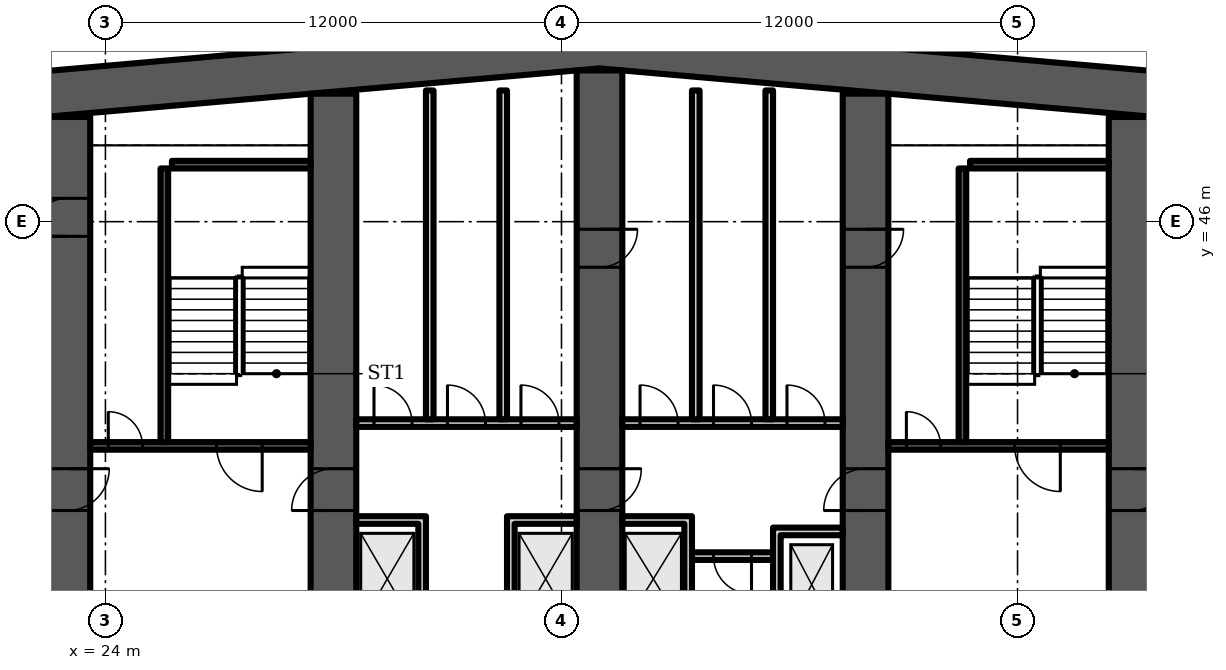
"""IFC4 building model, lengths in metres.
Left out: names, types, materials, properties, quantities, classifications, styles, units other than length and angle.
Written with IfcOpenShell. Run it as: python <this file> out.ifc"""

import sys

from ifc_helpers import new_model, si_unit, direction, frame, frame_2d, origin, place, context, subcontext, project, spatial, polyline, rectangle, outline, extrude, element, fill, save


model = new_model("IFC4")
c1 = context("Model", 3, precision=1e-05, world=origin(), true_north=direction((0.0, 1.0)))
c2 = subcontext(c1, "Body", "Model", "MODEL_VIEW")
j1 = project(units=[si_unit("LENGTHUNIT", "METRE"), si_unit("PLANEANGLEUNIT", "RADIAN")], contexts=[c1])
p1 = place(None, origin())
s1 = spatial("IfcSite", under=j1, at=p1, CompositionType="ELEMENT")
p2 = place(p1, origin())
s2 = spatial("IfcBuilding", under=s1, at=p2, CompositionType="ELEMENT")
p3 = place(p2, frame((0.0, 0.0, 84.7)))
s3 = spatial("IfcBuildingStorey", under=s2, at=p3, CompositionType="ELEMENT", Elevation=84.7)
p4 = place(p3, origin())
e1 = element("IfcWall", 1, at=p4, inside=s3, PredefinedType="SHEAR", context=c2, shape_type="SweptSolid", body=[
    extrude(outline(polyline([(9.0, 47.583), (37.0, 50.032), (65.0, 47.583), (65.0, 48.787), (37.0, 51.237), (9.0, 48.787), (9.0, 47.583)])), origin(), (0.0, 0.0, 1.0), 3.6),
])
p5 = place(p3, frame((23.0, 35.2, 0.0), z_axis=(0.0, 0.0, 1.0), x_axis=(0.0, 1.0, 0.0)))
e2 = element("IfcWall", 2, at=p5, inside=s3, PredefinedType="SHEAR", context=c2, shape_type="SweptSolid", body=[
    extrude(rectangle(XDim=13.555, YDim=1.2, at=frame_2d((6.778, 0.0))), origin(), (0.0, 0.0, 1.0), 3.6),
])
p6 = place(p5, frame((10.414, 0.0, 0.0)))
e3 = element("IfcOpeningElement", 3, at=p6, cuts=e2, PredefinedType="OPENING", context=c2, shape_type="SweptSolid", body=[
    extrude(rectangle(XDim=1.0, YDim=2.1, at=frame_2d((0.5, 1.05))), frame((0.0, 0.61, 0.0), z_axis=(0.0, -1.0, 0.0), x_axis=(1.0, 0.0, 0.0)), (0.0, 0.0, 1.0), 1.22),
])
p7 = place(p5, frame((3.2, 0.0, 0.0)))
e4 = element("IfcOpeningElement", 4, at=p7, cuts=e2, PredefinedType="OPENING", context=c2, shape_type="SweptSolid", body=[
    extrude(rectangle(XDim=1.1, YDim=2.1, at=frame_2d((0.55, 1.05))), frame((0.0, 0.61, 0.0), z_axis=(0.0, -1.0, 0.0), x_axis=(1.0, 0.0, 0.0)), (0.0, 0.0, 1.0), 1.22),
])
p8 = place(p3, frame((30.0, 35.2, 0.0), z_axis=(0.0, 0.0, 1.0), x_axis=(0.0, 1.0, 0.0)))
e5 = element("IfcWall", 5, at=p8, inside=s3, PredefinedType="SHEAR", context=c2, shape_type="SweptSolid", body=[
    extrude(rectangle(XDim=14.168, YDim=1.2, at=frame_2d((7.084, 0.0))), origin(), (0.0, 0.0, 1.0), 3.6),
])
p9 = place(p8, frame((3.2, 0.0, 0.0)))
e6 = element("IfcOpeningElement", 6, at=p9, cuts=e5, PredefinedType="OPENING", context=c2, shape_type="SweptSolid", body=[
    extrude(rectangle(XDim=1.1, YDim=2.1, at=frame_2d((0.55, 1.05))), frame((0.0, 0.61, 0.0), z_axis=(0.0, -1.0, 0.0), x_axis=(1.0, 0.0, 0.0)), (0.0, 0.0, 1.0), 1.22),
])
p10 = place(p3, frame((37.0, 35.2, 0.0), z_axis=(0.0, 0.0, 1.0), x_axis=(0.0, 1.0, 0.0)))
e7 = element("IfcWall", 7, at=p10, inside=s3, PredefinedType="SHEAR", context=c2, shape_type="SweptSolid", body=[
    extrude(rectangle(XDim=14.78, YDim=1.2, at=frame_2d((7.39, 0.0))), origin(), (0.0, 0.0, 1.0), 3.6),
])
p11 = place(p10, frame((3.2, 0.0, 0.0)))
e8 = element("IfcOpeningElement", 8, at=p11, cuts=e7, PredefinedType="OPENING", context=c2, shape_type="SweptSolid", body=[
    extrude(rectangle(XDim=1.1, YDim=2.1, at=frame_2d((0.55, 1.05))), frame((0.0, 0.61, 0.0), z_axis=(0.0, -1.0, 0.0), x_axis=(1.0, 0.0, 0.0)), (0.0, 0.0, 1.0), 1.22),
])
p12 = place(p10, frame((9.6, 0.0, 0.0)))
e9 = element("IfcOpeningElement", 9, at=p12, cuts=e7, PredefinedType="OPENING", context=c2, shape_type="SweptSolid", body=[
    extrude(rectangle(XDim=1.0, YDim=2.1, at=frame_2d((0.5, 1.05))), frame((0.0, 0.61, 0.0), z_axis=(0.0, -1.0, 0.0), x_axis=(1.0, 0.0, 0.0)), (0.0, 0.0, 1.0), 1.22),
])
p13 = place(p3, frame((44.0, 35.2, 0.0), z_axis=(0.0, 0.0, 1.0), x_axis=(0.0, 1.0, 0.0)))
e10 = element("IfcWall", 10, at=p13, inside=s3, PredefinedType="SHEAR", context=c2, shape_type="SweptSolid", body=[
    extrude(rectangle(XDim=14.168, YDim=1.2, at=frame_2d((7.084, 0.0))), origin(), (0.0, 0.0, 1.0), 3.6),
])
p14 = place(p13, frame((3.2, 0.0, 0.0)))
e11 = element("IfcOpeningElement", 11, at=p14, cuts=e10, PredefinedType="OPENING", context=c2, shape_type="SweptSolid", body=[
    extrude(rectangle(XDim=1.1, YDim=2.1, at=frame_2d((0.55, 1.05))), frame((0.0, 0.61, 0.0), z_axis=(0.0, -1.0, 0.0), x_axis=(1.0, 0.0, 0.0)), (0.0, 0.0, 1.0), 1.22),
])
p15 = place(p13, frame((9.6, 0.0, 0.0)))
e12 = element("IfcOpeningElement", 12, at=p15, cuts=e10, PredefinedType="OPENING", context=c2, shape_type="SweptSolid", body=[
    extrude(rectangle(XDim=1.0, YDim=2.1, at=frame_2d((0.5, 1.05))), frame((0.0, 0.61, 0.0), z_axis=(0.0, -1.0, 0.0), x_axis=(1.0, 0.0, 0.0)), (0.0, 0.0, 1.0), 1.22),
])
p16 = place(p3, frame((51.0, 35.2, 0.0), z_axis=(0.0, 0.0, 1.0), x_axis=(0.0, 1.0, 0.0)))
e13 = element("IfcWall", 13, at=p16, inside=s3, PredefinedType="SHEAR", context=c2, shape_type="SweptSolid", body=[
    extrude(rectangle(XDim=13.555, YDim=1.2, at=frame_2d((6.778, 0.0))), origin(), (0.0, 0.0, 1.0), 3.6),
])
p17 = place(p16, frame((3.2, 0.0, 0.0)))
e14 = element("IfcOpeningElement", 14, at=p17, cuts=e13, PredefinedType="OPENING", context=c2, shape_type="SweptSolid", body=[
    extrude(rectangle(XDim=1.1, YDim=2.1, at=frame_2d((0.55, 1.05))), frame((0.0, 0.61, 0.0), z_axis=(0.0, -1.0, 0.0), x_axis=(1.0, 0.0, 0.0)), (0.0, 0.0, 1.0), 1.22),
])
p18 = place(p3, frame((23.6, 40.1, 0.0), z_axis=(0.0, 0.0, 1.0), x_axis=(1.0, 0.0, 0.0)))
e15 = element("IfcWall", 15, at=p18, inside=s3, PredefinedType="SHEAR", context=c2, shape_type="SweptSolid", body=[
    extrude(rectangle(XDim=5.8, YDim=0.2, at=frame_2d((2.9, 0.0))), origin(), (0.0, 0.0, 1.0), 3.2),
])
p19 = place(p18, frame((3.325, 0.0, 0.0)))
e16 = element("IfcOpeningElement", 16, at=p19, cuts=e15, PredefinedType="OPENING", context=c2, shape_type="SweptSolid", body=[
    extrude(rectangle(XDim=1.2, YDim=2.1, at=frame_2d((0.6, 1.05))), frame((0.0, 0.11, 0.0), z_axis=(0.0, -1.0, 0.0), x_axis=(1.0, 0.0, 0.0)), (0.0, 0.0, 1.0), 0.22),
])
p20 = place(p18, frame((0.475, 0.0, 0.0)))
e17 = element("IfcOpeningElement", 17, at=p20, cuts=e15, PredefinedType="OPENING", context=c2, shape_type="SweptSolid", body=[
    extrude(rectangle(XDim=0.9, YDim=2.1, at=frame_2d((0.45, 1.05))), frame((0.0, 0.11, 0.0), z_axis=(0.0, -1.0, 0.0), x_axis=(1.0, 0.0, 0.0)), (0.0, 0.0, 1.0), 0.22),
])
p21 = place(p3, frame((25.55, 40.2, 0.0), z_axis=(0.0, 0.0, 1.0), x_axis=(0.0, 1.0, 0.0)))
e18 = element("IfcWall", 18, at=p21, inside=s3, PredefinedType="SHEAR", context=c2, shape_type="SweptSolid", body=[
    extrude(rectangle(XDim=7.2, YDim=0.2, at=frame_2d((3.6, 0.0))), origin(), (0.0, 0.0, 1.0), 3.2),
])
p22 = place(p3, frame((25.75, 47.5, 0.0), z_axis=(0.0, 0.0, 1.0), x_axis=(1.0, 0.0, 0.0)))
e19 = element("IfcWall", 19, at=p22, inside=s3, PredefinedType="SHEAR", context=c2, shape_type="SweptSolid", body=[
    extrude(rectangle(XDim=3.65, YDim=0.2, at=frame_2d((1.825, 0.0))), origin(), (0.0, 0.0, 1.0), 3.2),
])
p23 = place(p3, frame((30.6, 40.7, 0.0), z_axis=(0.0, 0.0, 1.0), x_axis=(1.0, 0.0, 0.0)))
e20 = element("IfcWall", 20, at=p23, inside=s3, PredefinedType="PARTITIONING", context=c2, shape_type="SweptSolid", body=[
    extrude(rectangle(XDim=5.8, YDim=0.2, at=frame_2d((2.9, 0.0))), origin(), (0.0, 0.0, 1.0), 3.2),
])
p24 = place(p23, frame((0.467, 0.0, 0.0)))
e21 = element("IfcOpeningElement", 21, at=p24, cuts=e20, PredefinedType="OPENING", context=c2, shape_type="SweptSolid", body=[
    extrude(rectangle(XDim=1.0, YDim=2.1, at=frame_2d((0.5, 1.05))), frame((0.0, 0.11, 0.0), z_axis=(0.0, -1.0, 0.0), x_axis=(1.0, 0.0, 0.0)), (0.0, 0.0, 1.0), 0.22),
])
p25 = place(p23, frame((2.4, 0.0, 0.0)))
e22 = element("IfcOpeningElement", 22, at=p25, cuts=e20, PredefinedType="OPENING", context=c2, shape_type="SweptSolid", body=[
    extrude(rectangle(XDim=1.0, YDim=2.1, at=frame_2d((0.5, 1.05))), frame((0.0, 0.11, 0.0), z_axis=(0.0, -1.0, 0.0), x_axis=(1.0, 0.0, 0.0)), (0.0, 0.0, 1.0), 0.22),
])
p26 = place(p23, frame((4.333, 0.0, 0.0)))
e23 = element("IfcOpeningElement", 23, at=p26, cuts=e20, PredefinedType="OPENING", context=c2, shape_type="SweptSolid", body=[
    extrude(rectangle(XDim=1.0, YDim=2.1, at=frame_2d((0.5, 1.05))), frame((0.0, 0.11, 0.0), z_axis=(0.0, -1.0, 0.0), x_axis=(1.0, 0.0, 0.0)), (0.0, 0.0, 1.0), 0.22),
])
p27 = place(p3, frame((0.0, 0.0, -0.0)))
e24 = element("IfcWall", 24, at=p27, inside=s3, PredefinedType="PARTITIONING", context=c2, shape_type="SweptSolid", body=[
    extrude(outline(polyline([(32.233, 38.05), (30.6, 38.05), (30.6, 38.25), (32.233, 38.25), (32.433, 38.25), (32.433, 35.2), (32.233, 35.2), (32.233, 38.05)])), origin(), (0.0, 0.0, 1.0), 3.2),
])
p28 = place(p3, frame((0.0, 0.0, -0.0)))
e25 = element("IfcWall", 25, at=p28, inside=s3, PredefinedType="PARTITIONING", context=c2, shape_type="SweptSolid", body=[
    extrude(outline(polyline([(34.567, 38.25), (34.767, 38.25), (36.4, 38.25), (36.4, 38.05), (34.767, 38.05), (34.767, 35.2), (34.567, 35.2), (34.567, 38.25)])), origin(), (0.0, 0.0, 1.0), 3.2),
])
for number, where, z_axis, x_axis in (
    (26, (32.533, 40.8, 0.0), (0.0, 0.0, 1.0), (0.0, 1.0, 0.0)),
    (27, (34.467, 40.8, 0.0), (0.0, 0.0, 1.0), (0.0, 1.0, 0.0)),
):
    element("IfcWall", number, at=place(p3, frame(where, z_axis=z_axis, x_axis=x_axis)), inside=s3, PredefinedType="PARTITIONING", context=c2, shape_type="SweptSolid", body=[
        extrude(rectangle(XDim=8.653, YDim=0.2, at=frame_2d((4.326, 0.0))), origin(), (0.0, 0.0, 1.0), 3.2),
    ])
p29 = place(p3, frame((39.433, 37.2, 0.0), z_axis=(0.0, 0.0, 1.0), x_axis=(1.0, 0.0, 0.0)))
e28 = element("IfcWall", 28, at=p29, inside=s3, PredefinedType="PARTITIONING", context=c2, shape_type="SweptSolid", body=[
    extrude(rectangle(XDim=2.133, YDim=0.2, at=frame_2d((1.067, 0.0))), origin(), (0.0, 0.0, 1.0), 3.2),
])
p30 = place(p29, frame((0.567, 0.0, 0.0)))
e29 = element("IfcOpeningElement", 29, at=p30, cuts=e28, PredefinedType="OPENING", context=c2, shape_type="SweptSolid", body=[
    extrude(rectangle(XDim=1.0, YDim=2.1, at=frame_2d((0.5, 1.05))), frame((0.0, 0.11, 0.0), z_axis=(0.0, -1.0, 0.0), x_axis=(1.0, 0.0, 0.0)), (0.0, 0.0, 1.0), 0.22),
])
p31 = place(p3, frame((37.6, 40.7, 0.0), z_axis=(0.0, 0.0, 1.0), x_axis=(1.0, 0.0, 0.0)))
e30 = element("IfcWall", 30, at=p31, inside=s3, PredefinedType="PARTITIONING", context=c2, shape_type="SweptSolid", body=[
    extrude(rectangle(XDim=5.8, YDim=0.2, at=frame_2d((2.9, 0.0))), origin(), (0.0, 0.0, 1.0), 3.2),
])
p32 = place(p31, frame((0.467, 0.0, 0.0)))
e31 = element("IfcOpeningElement", 31, at=p32, cuts=e30, PredefinedType="OPENING", context=c2, shape_type="SweptSolid", body=[
    extrude(rectangle(XDim=1.0, YDim=2.1, at=frame_2d((0.5, 1.05))), frame((0.0, 0.11, 0.0), z_axis=(0.0, -1.0, 0.0), x_axis=(1.0, 0.0, 0.0)), (0.0, 0.0, 1.0), 0.22),
])
p33 = place(p31, frame((2.4, 0.0, 0.0)))
e32 = element("IfcOpeningElement", 32, at=p33, cuts=e30, PredefinedType="OPENING", context=c2, shape_type="SweptSolid", body=[
    extrude(rectangle(XDim=1.0, YDim=2.1, at=frame_2d((0.5, 1.05))), frame((0.0, 0.11, 0.0), z_axis=(0.0, -1.0, 0.0), x_axis=(1.0, 0.0, 0.0)), (0.0, 0.0, 1.0), 0.22),
])
p34 = place(p31, frame((4.333, 0.0, 0.0)))
e33 = element("IfcOpeningElement", 33, at=p34, cuts=e30, PredefinedType="OPENING", context=c2, shape_type="SweptSolid", body=[
    extrude(rectangle(XDim=1.0, YDim=2.1, at=frame_2d((0.5, 1.05))), frame((0.0, 0.11, 0.0), z_axis=(0.0, -1.0, 0.0), x_axis=(1.0, 0.0, 0.0)), (0.0, 0.0, 1.0), 0.22),
])
p35 = place(p3, frame((0.0, 0.0, -0.0)))
e34 = element("IfcWall", 34, at=p35, inside=s3, PredefinedType="PARTITIONING", context=c2, shape_type="SweptSolid", body=[
    extrude(outline(polyline([(41.567, 37.95), (41.767, 37.95), (43.4, 37.95), (43.4, 37.75), (41.767, 37.75), (41.767, 35.2), (41.567, 35.2), (41.567, 37.95)])), origin(), (0.0, 0.0, 1.0), 3.2),
])
p36 = place(p3, frame((0.0, 0.0, -0.0)))
e35 = element("IfcWall", 35, at=p36, inside=s3, PredefinedType="PARTITIONING", context=c2, shape_type="SweptSolid", body=[
    extrude(outline(polyline([(39.233, 38.05), (37.6, 38.05), (37.6, 38.25), (39.233, 38.25), (39.433, 38.25), (39.433, 35.2), (39.233, 35.2), (39.233, 38.05)])), origin(), (0.0, 0.0, 1.0), 3.2),
])
for number, where, z_axis, x_axis in (
    (36, (39.533, 40.8, 0.0), (0.0, 0.0, 1.0), (0.0, 1.0, 0.0)),
    (37, (41.467, 40.8, 0.0), (0.0, 0.0, 1.0), (0.0, 1.0, 0.0)),
):
    element("IfcWall", number, at=place(p3, frame(where, z_axis=z_axis, x_axis=x_axis)), inside=s3, PredefinedType="PARTITIONING", context=c2, shape_type="SweptSolid", body=[
        extrude(rectangle(XDim=8.653, YDim=0.2, at=frame_2d((4.326, 0.0))), origin(), (0.0, 0.0, 1.0), 3.2),
    ])
p37 = place(p3, frame((44.6, 40.1, 0.0), z_axis=(0.0, 0.0, 1.0), x_axis=(1.0, 0.0, 0.0)))
e38 = element("IfcWall", 38, at=p37, inside=s3, PredefinedType="SHEAR", context=c2, shape_type="SweptSolid", body=[
    extrude(rectangle(XDim=5.8, YDim=0.2, at=frame_2d((2.9, 0.0))), origin(), (0.0, 0.0, 1.0), 3.2),
])
p38 = place(p37, frame((3.325, 0.0, 0.0)))
e39 = element("IfcOpeningElement", 39, at=p38, cuts=e38, PredefinedType="OPENING", context=c2, shape_type="SweptSolid", body=[
    extrude(rectangle(XDim=1.2, YDim=2.1, at=frame_2d((0.6, 1.05))), frame((0.0, 0.11, 0.0), z_axis=(0.0, -1.0, 0.0), x_axis=(1.0, 0.0, 0.0)), (0.0, 0.0, 1.0), 0.22),
])
p39 = place(p37, frame((0.475, 0.0, 0.0)))
e40 = element("IfcOpeningElement", 40, at=p39, cuts=e38, PredefinedType="OPENING", context=c2, shape_type="SweptSolid", body=[
    extrude(rectangle(XDim=0.9, YDim=2.1, at=frame_2d((0.45, 1.05))), frame((0.0, 0.11, 0.0), z_axis=(0.0, -1.0, 0.0), x_axis=(1.0, 0.0, 0.0)), (0.0, 0.0, 1.0), 0.22),
])
p40 = place(p3, frame((46.55, 40.2, 0.0), z_axis=(0.0, 0.0, 1.0), x_axis=(0.0, 1.0, 0.0)))
e41 = element("IfcWall", 41, at=p40, inside=s3, PredefinedType="SHEAR", context=c2, shape_type="SweptSolid", body=[
    extrude(rectangle(XDim=7.2, YDim=0.2, at=frame_2d((3.6, 0.0))), origin(), (0.0, 0.0, 1.0), 3.2),
])
p41 = place(p3, frame((46.75, 47.5, 0.0), z_axis=(0.0, 0.0, 1.0), x_axis=(1.0, 0.0, 0.0)))
e42 = element("IfcWall", 42, at=p41, inside=s3, PredefinedType="SHEAR", context=c2, shape_type="SweptSolid", body=[
    extrude(rectangle(XDim=3.65, YDim=0.2, at=frame_2d((1.825, 0.0))), origin(), (0.0, 0.0, 1.0), 3.2),
])
p42 = place(p6, origin())
e43 = element("IfcDoor", 43, at=p42, inside=s3, OperationType="SINGLE_SWING_LEFT", PredefinedType="DOOR", context=c2, shape_type="SweptSolid", body=[
    extrude(rectangle(XDim=1.0, YDim=2.1, at=frame_2d((0.5, 1.05))), frame((0.0, 0.6, 0.0), z_axis=(0.0, -1.0, 0.0), x_axis=(1.0, 0.0, 0.0)), (0.0, 0.0, 1.0), 1.199),
])
fill(e3, e43)
p43 = place(p19, origin())
e44 = element("IfcDoor", 44, at=p43, inside=s3, OperationType="SINGLE_SWING_RIGHT", PredefinedType="DOOR", context=c2, shape_type="SweptSolid", body=[
    extrude(rectangle(XDim=1.2, YDim=2.1, at=frame_2d((0.6, 1.05))), frame((0.0, 0.025, 0.0), z_axis=(0.0, -1.0, 0.0), x_axis=(1.0, 0.0, 0.0)), (0.0, 0.0, 1.0), 0.05),
])
fill(e16, e44)
p44 = place(p20, origin())
e45 = element("IfcDoor", 45, at=p44, inside=s3, OperationType="SINGLE_SWING_LEFT", PredefinedType="DOOR", context=c2, shape_type="SweptSolid", body=[
    extrude(rectangle(XDim=0.9, YDim=2.1, at=frame_2d((0.45, 1.05))), frame((0.0, 0.025, 0.0), z_axis=(0.0, -1.0, 0.0), x_axis=(1.0, 0.0, 0.0)), (0.0, 0.0, 1.0), 0.05),
])
fill(e17, e45)
p45 = place(p24, origin())
e46 = element("IfcDoor", 46, at=p45, inside=s3, OperationType="SINGLE_SWING_LEFT", PredefinedType="DOOR", context=c2, shape_type="SweptSolid", body=[
    extrude(rectangle(XDim=1.0, YDim=2.1, at=frame_2d((0.5, 1.05))), frame((0.0, 0.025, 0.0), z_axis=(0.0, -1.0, 0.0), x_axis=(1.0, 0.0, 0.0)), (0.0, 0.0, 1.0), 0.05),
])
fill(e21, e46)
p46 = place(p25, origin())
e47 = element("IfcDoor", 47, at=p46, inside=s3, OperationType="SINGLE_SWING_LEFT", PredefinedType="DOOR", context=c2, shape_type="SweptSolid", body=[
    extrude(rectangle(XDim=1.0, YDim=2.1, at=frame_2d((0.5, 1.05))), frame((0.0, 0.025, 0.0), z_axis=(0.0, -1.0, 0.0), x_axis=(1.0, 0.0, 0.0)), (0.0, 0.0, 1.0), 0.05),
])
fill(e22, e47)
p47 = place(p26, origin())
e48 = element("IfcDoor", 48, at=p47, inside=s3, OperationType="SINGLE_SWING_LEFT", PredefinedType="DOOR", context=c2, shape_type="SweptSolid", body=[
    extrude(rectangle(XDim=1.0, YDim=2.1, at=frame_2d((0.5, 1.05))), frame((0.0, 0.025, 0.0), z_axis=(0.0, -1.0, 0.0), x_axis=(1.0, 0.0, 0.0)), (0.0, 0.0, 1.0), 0.05),
])
fill(e23, e48)
p48 = place(p30, origin())
e49 = element("IfcDoor", 49, at=p48, inside=s3, OperationType="SINGLE_SWING_RIGHT", PredefinedType="DOOR", context=c2, shape_type="SweptSolid", body=[
    extrude(rectangle(XDim=1.0, YDim=2.1, at=frame_2d((0.5, 1.05))), frame((0.0, 0.025, 0.0), z_axis=(0.0, -1.0, 0.0), x_axis=(1.0, 0.0, 0.0)), (0.0, 0.0, 1.0), 0.05),
])
fill(e29, e49)
p49 = place(p32, origin())
e50 = element("IfcDoor", 50, at=p49, inside=s3, OperationType="SINGLE_SWING_LEFT", PredefinedType="DOOR", context=c2, shape_type="SweptSolid", body=[
    extrude(rectangle(XDim=1.0, YDim=2.1, at=frame_2d((0.5, 1.05))), frame((0.0, 0.025, 0.0), z_axis=(0.0, -1.0, 0.0), x_axis=(1.0, 0.0, 0.0)), (0.0, 0.0, 1.0), 0.05),
])
fill(e31, e50)
p50 = place(p33, origin())
e51 = element("IfcDoor", 51, at=p50, inside=s3, OperationType="SINGLE_SWING_LEFT", PredefinedType="DOOR", context=c2, shape_type="SweptSolid", body=[
    extrude(rectangle(XDim=1.0, YDim=2.1, at=frame_2d((0.5, 1.05))), frame((0.0, 0.025, 0.0), z_axis=(0.0, -1.0, 0.0), x_axis=(1.0, 0.0, 0.0)), (0.0, 0.0, 1.0), 0.05),
])
fill(e32, e51)
p51 = place(p34, origin())
e52 = element("IfcDoor", 52, at=p51, inside=s3, OperationType="SINGLE_SWING_LEFT", PredefinedType="DOOR", context=c2, shape_type="SweptSolid", body=[
    extrude(rectangle(XDim=1.0, YDim=2.1, at=frame_2d((0.5, 1.05))), frame((0.0, 0.025, 0.0), z_axis=(0.0, -1.0, 0.0), x_axis=(1.0, 0.0, 0.0)), (0.0, 0.0, 1.0), 0.05),
])
fill(e33, e52)
p52 = place(p38, origin())
e53 = element("IfcDoor", 53, at=p52, inside=s3, OperationType="SINGLE_SWING_RIGHT", PredefinedType="DOOR", context=c2, shape_type="SweptSolid", body=[
    extrude(rectangle(XDim=1.2, YDim=2.1, at=frame_2d((0.6, 1.05))), frame((0.0, 0.025, 0.0), z_axis=(0.0, -1.0, 0.0), x_axis=(1.0, 0.0, 0.0)), (0.0, 0.0, 1.0), 0.05),
])
fill(e39, e53)
p53 = place(p39, origin())
e54 = element("IfcDoor", 54, at=p53, inside=s3, OperationType="SINGLE_SWING_LEFT", PredefinedType="DOOR", context=c2, shape_type="SweptSolid", body=[
    extrude(rectangle(XDim=0.9, YDim=2.1, at=frame_2d((0.45, 1.05))), frame((0.0, 0.025, 0.0), z_axis=(0.0, -1.0, 0.0), x_axis=(1.0, 0.0, 0.0)), (0.0, 0.0, 1.0), 0.05),
])
fill(e40, e54)
p54 = place(p7, origin())
e55 = element("IfcDoor", 55, at=p54, inside=s3, OperationType="SINGLE_SWING_RIGHT", PredefinedType="DOOR", context=c2, shape_type="SweptSolid", body=[
    extrude(rectangle(XDim=1.1, YDim=2.1, at=frame_2d((0.55, 1.05))), frame((0.0, 0.025, 0.0), z_axis=(0.0, -1.0, 0.0), x_axis=(1.0, 0.0, 0.0)), (0.0, 0.0, 1.0), 0.05),
])
fill(e4, e55)
p55 = place(p9, origin())
e56 = element("IfcDoor", 56, at=p55, inside=s3, OperationType="SINGLE_SWING_LEFT", PredefinedType="DOOR", context=c2, shape_type="SweptSolid", body=[
    extrude(rectangle(XDim=1.1, YDim=2.1, at=frame_2d((0.55, 1.05))), frame((0.0, 0.025, 0.0), z_axis=(0.0, -1.0, 0.0), x_axis=(1.0, 0.0, 0.0)), (0.0, 0.0, 1.0), 0.05),
])
fill(e6, e56)
p56 = place(p11, origin())
e57 = element("IfcDoor", 57, at=p56, inside=s3, OperationType="SINGLE_SWING_RIGHT", PredefinedType="DOOR", context=c2, shape_type="SweptSolid", body=[
    extrude(rectangle(XDim=1.1, YDim=2.1, at=frame_2d((0.55, 1.05))), frame((0.0, 0.025, 0.0), z_axis=(0.0, -1.0, 0.0), x_axis=(1.0, 0.0, 0.0)), (0.0, 0.0, 1.0), 0.05),
])
fill(e8, e57)
p57 = place(p12, origin())
e58 = element("IfcDoor", 58, at=p57, inside=s3, OperationType="SINGLE_SWING_RIGHT", PredefinedType="DOOR", context=c2, shape_type="SweptSolid", body=[
    extrude(rectangle(XDim=1.0, YDim=2.1, at=frame_2d((0.5, 1.05))), frame((0.0, 0.6, 0.0), z_axis=(0.0, -1.0, 0.0), x_axis=(1.0, 0.0, 0.0)), (0.0, 0.0, 1.0), 1.199),
])
fill(e9, e58)
p58 = place(p14, origin())
e59 = element("IfcDoor", 59, at=p58, inside=s3, OperationType="SINGLE_SWING_LEFT", PredefinedType="DOOR", context=c2, shape_type="SweptSolid", body=[
    extrude(rectangle(XDim=1.1, YDim=2.1, at=frame_2d((0.55, 1.05))), frame((0.0, 0.025, 0.0), z_axis=(0.0, -1.0, 0.0), x_axis=(1.0, 0.0, 0.0)), (0.0, 0.0, 1.0), 0.05),
])
fill(e11, e59)
p59 = place(p15, origin())
e60 = element("IfcDoor", 60, at=p59, inside=s3, OperationType="SINGLE_SWING_RIGHT", PredefinedType="DOOR", context=c2, shape_type="SweptSolid", body=[
    extrude(rectangle(XDim=1.0, YDim=2.1, at=frame_2d((0.5, 1.05))), frame((0.0, 0.6, 0.0), z_axis=(0.0, -1.0, 0.0), x_axis=(1.0, 0.0, 0.0)), (0.0, 0.0, 1.0), 1.199),
])
fill(e12, e60)
p60 = place(p17, origin())
e61 = element("IfcDoor", 61, at=p60, inside=s3, OperationType="SINGLE_SWING_RIGHT", PredefinedType="DOOR", context=c2, shape_type="SweptSolid", body=[
    extrude(rectangle(XDim=1.1, YDim=2.1, at=frame_2d((0.55, 1.05))), frame((0.0, 0.025, 0.0), z_axis=(0.0, -1.0, 0.0), x_axis=(1.0, 0.0, 0.0)), (0.0, 0.0, 1.0), 0.05),
])
fill(e14, e61)
save(model, sys.argv[1])
